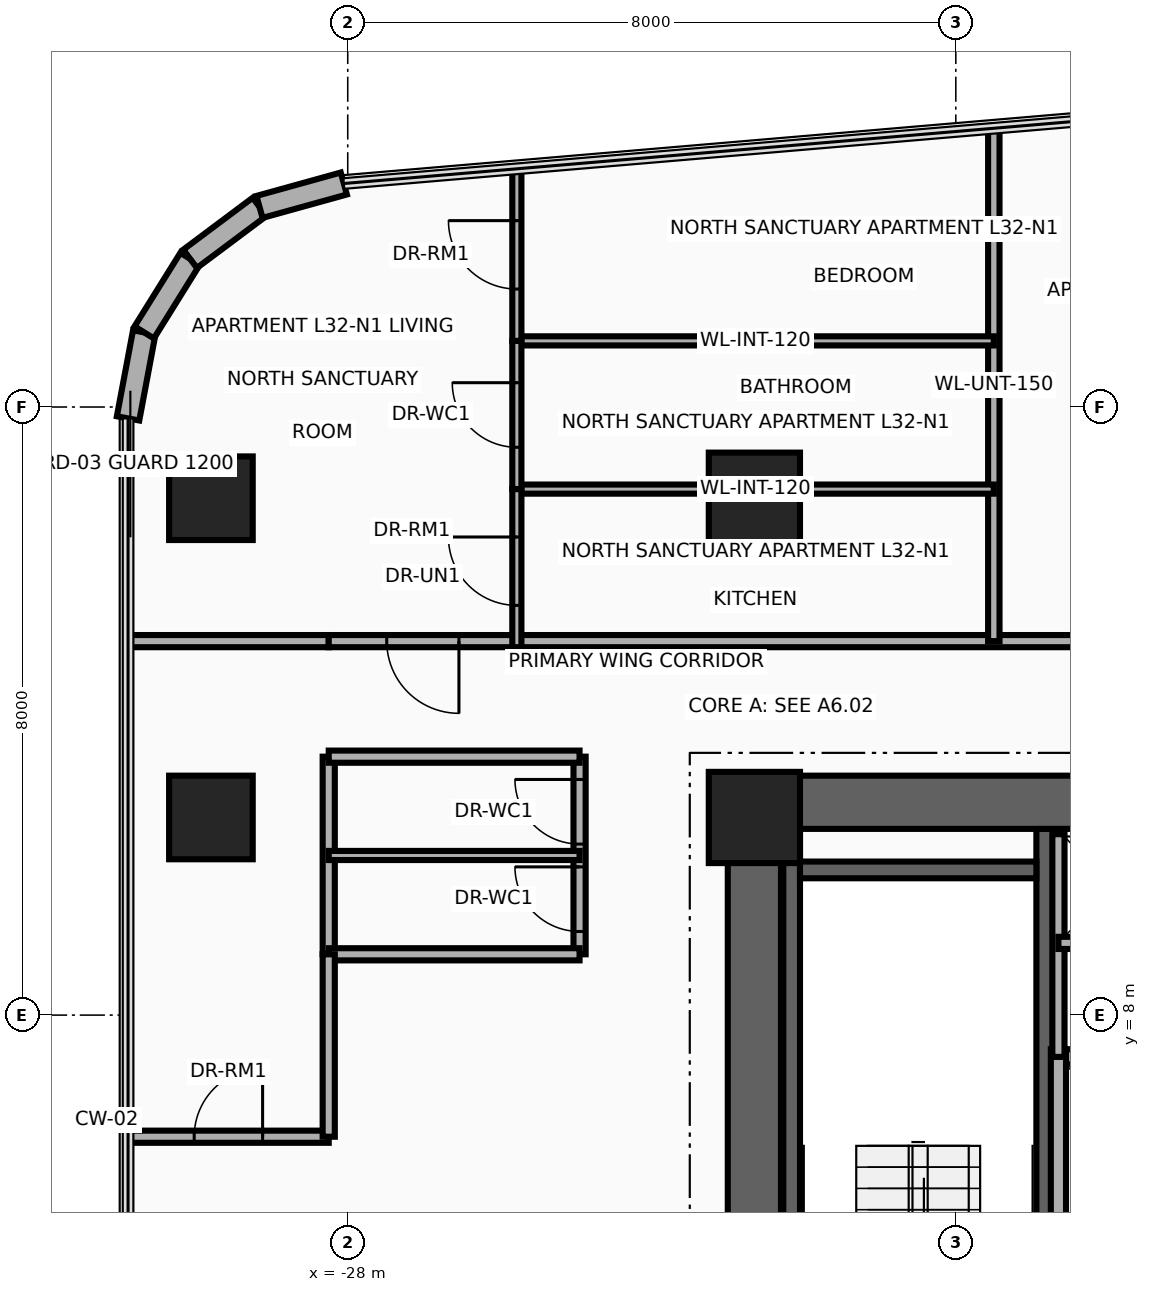
"""IFC4 building model, lengths in metres.
Left out: names, types, materials, properties, quantities, classifications, styles, units other than length and angle.
Written with IfcOpenShell. Run it as: python <this file> out.ifc"""

import sys

from ifc_helpers import new_model, si_unit, direction, frame, frame_2d, origin, origin_2d, place, context, subcontext, project, spatial, rectangle, circle, extrude, source, transform, mapped, element, fill, save


model = new_model("IFC4")
c1 = context("Model", 3, precision=1e-05, world=origin(), true_north=direction((0.0, 1.0)))
c2 = subcontext(c1, "Body", "Model", "MODEL_VIEW")
j1 = project(units=[si_unit("LENGTHUNIT", "METRE"), si_unit("PLANEANGLEUNIT", "RADIAN")], contexts=[c1])
p1 = place(None, origin())
s1 = spatial("IfcSite", under=j1, at=p1, CompositionType="ELEMENT")
p2 = place(p1, origin())
s2 = spatial("IfcBuilding", under=s1, at=p2, CompositionType="ELEMENT")
p3 = place(p2, frame((0.0, 0.0, 127.9)))
s3 = spatial("IfcBuildingStorey", under=s2, at=p3, CompositionType="ELEMENT", Elevation=127.9)
for number, where, z_axis, x_axis in (
    (1, (-22.16, 1.78, 0.0), (0.0, 0.0, 1.0), (0.0, 1.0, 0.0)),
    (2, (-18.83, 1.78, 0.0), (0.0, 0.0, 1.0), (0.0, 1.0, 0.0)),
):
    element("IfcWall", number, at=place(p3, frame(where, z_axis=z_axis, x_axis=x_axis)), inside=s3, PredefinedType="SHEAR", context=c2, shape_type="SweptSolid", body=[
        extrude(rectangle(XDim=8.67, YDim=0.22, at=frame_2d((4.335, 0.0))), origin(), (0.0, 0.0, 1.0), 3.46),
    ])
p4 = place(p3, frame((-22.05, 9.91, 0.0), z_axis=(0.0, 0.0, 1.0), x_axis=(1.0, 0.0, 0.0)))
e3 = element("IfcWall", 3, at=p4, inside=s3, PredefinedType="SHEAR", context=c2, shape_type="SweptSolid", body=[
    extrude(rectangle(XDim=3.11, YDim=0.22, at=frame_2d((1.555, 0.0))), origin(), (0.0, 0.0, 1.0), 3.46),
])
p5 = place(p3, frame((-22.65, -11.15, 0.0), z_axis=(0.0, 0.0, 1.0), x_axis=(0.0, 1.0, 0.0)))
e4 = element("IfcWall", 4, at=p5, inside=s3, PredefinedType="SHEAR", context=c2, shape_type="SweptSolid", body=[
    extrude(rectangle(XDim=22.3, YDim=0.7, at=frame_2d((11.15, 0.0))), origin(), (0.0, 0.0, 1.0), 3.46),
])
p6 = place(p3, frame((-22.65, 10.8, 0.0), z_axis=(0.0, 0.0, 1.0), x_axis=(1.0, 0.0, 0.0)))
e5 = element("IfcWall", 5, at=p6, inside=s3, PredefinedType="SHEAR", context=c2, shape_type="SweptSolid", body=[
    extrude(rectangle(XDim=10.25, YDim=0.7, at=frame_2d((5.125, 0.0))), origin(), (0.0, 0.0, 1.0), 3.46),
])
m1 = source(origin(), c2, "Body", "SweptSolid", [
    extrude(circle(Radius=0.55, at=origin_2d()), origin(), (0.0, 0.0, 1.0), 3.7),
])
p7 = place(p3, frame((-29.8, 10.6, 0.0), z_axis=(0.0, 0.0, 1.0), x_axis=(1.0, 0.0, 0.0)))
e6 = element("IfcColumn", 6, at=p7, inside=s3, PredefinedType="COLUMN", context=c2, shape_type="MappedRepresentation", body=[
    mapped(m1, transform((0.0, 0.0, 0.0), x_axis=(1.0, 0.0, 0.0), y_axis=(0.0, 1.0, 0.0), z_axis=(0.0, 0.0, 1.0), scale=1.0)),
])
m2 = source(origin(), c2, "Body", "SweptSolid", [
    extrude(rectangle(XDim=1.2, YDim=1.2, at=origin_2d()), origin(), (0.0, 0.0, 1.0), 3.7),
])
p8 = place(p3, frame((-22.65, 10.6, 0.0), z_axis=(0.0, 0.0, 1.0), x_axis=(1.0, 0.0, 0.0)))
e7 = element("IfcColumn", 7, at=p8, inside=s3, PredefinedType="COLUMN", context=c2, shape_type="MappedRepresentation", body=[
    mapped(m2, transform((0.0, 0.0, 0.0), x_axis=(1.0, 0.0, 0.0), y_axis=(0.0, 1.0, 0.0), z_axis=(0.0, 0.0, 1.0), scale=1.0)),
])
p9 = place(p3, frame((-29.8, 14.8, 0.0), z_axis=(0.0, 0.0, 1.0), x_axis=(1.0, 0.0, 0.0)))
e8 = element("IfcColumn", 8, at=p9, inside=s3, PredefinedType="COLUMN", context=c2, shape_type="MappedRepresentation", body=[
    mapped(m1, transform((0.0, 0.0, 0.0), x_axis=(1.0, 0.0, 0.0), y_axis=(0.0, 1.0, 0.0), z_axis=(0.0, 0.0, 1.0), scale=1.0)),
])
p10 = place(p3, frame((-22.65, 14.8, 0.0), z_axis=(0.0, 0.0, 1.0), x_axis=(1.0, 0.0, 0.0)))
e9 = element("IfcColumn", 9, at=p10, inside=s3, PredefinedType="COLUMN", context=c2, shape_type="MappedRepresentation", body=[
    mapped(m2, transform((0.0, 0.0, 0.0), x_axis=(1.0, 0.0, 0.0), y_axis=(0.0, 1.0, 0.0), z_axis=(0.0, 0.0, 1.0), scale=1.0)),
])
p11 = place(p3, frame((-30.89, 15.85, 0.0), z_axis=(0.0, 0.0, 1.0), x_axis=(0.184557499391, 0.982821718023, 0.0)))
e10 = element("IfcWall", 10, at=p11, inside=s3, PredefinedType="SOLIDWALL", context=c2, shape_type="SweptSolid", body=[
    extrude(rectangle(XDim=1.151, YDim=0.3, at=frame_2d((0.575, 0.0))), origin(), (0.0, 0.0, 1.0), 3.46),
])
p12 = place(p3, frame((-30.677, 16.981, 0.0), z_axis=(0.0, 0.0, 1.0), x_axis=(0.52880576008, 0.848742875143, 0.0)))
e11 = element("IfcWall", 11, at=p12, inside=s3, PredefinedType="SOLIDWALL", context=c2, shape_type="SweptSolid", body=[
    extrude(rectangle(XDim=1.141, YDim=0.3, at=frame_2d((0.57, 0.0))), origin(), (0.0, 0.0, 1.0), 3.46),
])
p13 = place(p3, frame((-30.074, 17.95, 0.0), z_axis=(0.0, 0.0, 1.0), x_axis=(0.800975009324, 0.598697782223, 0.0)))
e12 = element("IfcWall", 12, at=p13, inside=s3, PredefinedType="SOLIDWALL", context=c2, shape_type="SweptSolid", body=[
    extrude(rectangle(XDim=1.141, YDim=0.3, at=frame_2d((0.57, 0.0))), origin(), (0.0, 0.0, 1.0), 3.46),
])
p14 = place(p3, frame((-29.161, 18.633, 0.0), z_axis=(0.0, 0.0, 1.0), x_axis=(0.963624193367, 0.267260947313, 0.0)))
e13 = element("IfcWall", 13, at=p14, inside=s3, PredefinedType="SOLIDWALL", context=c2, shape_type="SweptSolid", body=[
    extrude(rectangle(XDim=1.151, YDim=0.3, at=frame_2d((0.575, 0.0))), origin(), (0.0, 0.0, 1.0), 3.46),
])
p15 = place(p3, frame((-18.65, 4.225, 0.0), z_axis=(0.0, 0.0, 1.0), x_axis=(0.0, 1.0, 0.0)))
e14 = element("IfcWall", 14, at=p15, inside=s3, PredefinedType="MOVABLE", context=c2, shape_type="SweptSolid", body=[
    extrude(rectangle(XDim=3.325, YDim=0.2, at=frame_2d((1.663, 0.0))), origin(), (0.0, 0.0, 1.0), 3.46),
])
p16 = place(p3, frame((-18.55, 7.45, 0.0), z_axis=(0.0, 0.0, 1.0), x_axis=(1.0, 0.0, 0.0)))
e15 = element("IfcWall", 15, at=p16, inside=s3, PredefinedType="MOVABLE", context=c2, shape_type="SweptSolid", body=[
    extrude(rectangle(XDim=2.6, YDim=0.2, at=frame_2d((1.3, 0.0))), origin(), (0.0, 0.0, 1.0), 3.46),
])
p17 = place(p16, frame((0.7, 0.0, 0.0)))
e16 = element("IfcOpeningElement", 16, at=p17, cuts=e15, PredefinedType="OPENING", context=c2, shape_type="SweptSolid", body=[
    extrude(rectangle(XDim=1.2, YDim=2.1, at=frame_2d((0.6, 1.05))), frame((0.0, 0.115, 0.0), z_axis=(0.0, -1.0, 0.0), x_axis=(1.0, 0.0, 0.0)), (0.0, 0.0, 1.0), 0.23),
])
p18 = place(p3, frame((-18.65, 7.45, 0.0), z_axis=(0.0, 0.0, 1.0), x_axis=(0.0, 1.0, 0.0)))
e17 = element("IfcWall", 17, at=p18, inside=s3, PredefinedType="PARTITIONING", context=c2, shape_type="SweptSolid", body=[
    extrude(rectangle(XDim=2.93, YDim=0.16, at=frame_2d((1.465, 0.0))), origin(), (0.0, 0.0, 1.0), 3.46),
])
p19 = place(p3, frame((-18.65, 8.95, 0.0), z_axis=(0.0, 0.0, 1.0), x_axis=(1.0, 0.0, 0.0)))
e18 = element("IfcWall", 18, at=p19, inside=s3, PredefinedType="PARTITIONING", context=c2, shape_type="SweptSolid", body=[
    extrude(rectangle(XDim=5.5, YDim=0.16, at=frame_2d((2.75, 0.0))), origin(), (0.0, 0.0, 1.0), 3.46),
])
p20 = place(p19, frame((0.3, 0.0, 0.0)))
e19 = element("IfcOpeningElement", 19, at=p20, cuts=e18, PredefinedType="OPENING", context=c2, shape_type="SweptSolid", body=[
    extrude(rectangle(XDim=0.85, YDim=2.05, at=frame_2d((0.425, 1.025))), frame((0.0, 0.095, 0.0), z_axis=(0.0, -1.0, 0.0), x_axis=(1.0, 0.0, 0.0)), (0.0, 0.0, 1.0), 0.19),
])
p21 = place(p19, frame((2.5, 0.0, 0.0)))
e20 = element("IfcOpeningElement", 20, at=p21, cuts=e18, PredefinedType="OPENING", context=c2, shape_type="SweptSolid", body=[
    extrude(rectangle(XDim=0.95, YDim=2.15, at=frame_2d((0.475, 1.075))), frame((0.0, 0.095, 0.0), z_axis=(0.0, -1.0, 0.0), x_axis=(1.0, 0.0, 0.0)), (0.0, 0.0, 1.0), 0.19),
])
p22 = place(p3, frame((-28.25, 8.8, 0.0), z_axis=(0.0, 0.0, 1.0), x_axis=(0.0, 1.0, 0.0)))
e21 = element("IfcWall", 21, at=p22, inside=s3, PredefinedType="PARTITIONING", context=c2, shape_type="SweptSolid", body=[
    extrude(rectangle(XDim=2.6, YDim=0.16, at=frame_2d((1.3, 0.0))), origin(), (0.0, 0.0, 1.0), 2.666),
])
p23 = place(p3, frame((-24.95, 8.8, 0.0), z_axis=(0.0, 0.0, 1.0), x_axis=(0.0, 1.0, 0.0)))
e22 = element("IfcWall", 22, at=p23, inside=s3, PredefinedType="PARTITIONING", context=c2, shape_type="SweptSolid", body=[
    extrude(rectangle(XDim=2.6, YDim=0.16, at=frame_2d((1.3, 0.0))), origin(), (0.0, 0.0, 1.0), 2.666),
])
p24 = place(p23, frame((0.3, 0.0, 0.0)))
e23 = element("IfcOpeningElement", 23, at=p24, cuts=e22, PredefinedType="OPENING", context=c2, shape_type="SweptSolid", body=[
    extrude(rectangle(XDim=0.85, YDim=2.1, at=frame_2d((0.425, 1.05))), frame((0.0, 0.095, 0.0), z_axis=(0.0, -1.0, 0.0), x_axis=(1.0, 0.0, 0.0)), (0.0, 0.0, 1.0), 0.19),
])
p25 = place(p23, frame((1.45, 0.0, 0.0)))
e24 = element("IfcOpeningElement", 24, at=p25, cuts=e22, PredefinedType="OPENING", context=c2, shape_type="SweptSolid", body=[
    extrude(rectangle(XDim=0.85, YDim=2.1, at=frame_2d((0.425, 1.05))), frame((0.0, 0.095, 0.0), z_axis=(0.0, -1.0, 0.0), x_axis=(1.0, 0.0, 0.0)), (0.0, 0.0, 1.0), 0.19),
])
for number, where, z_axis, x_axis in (
    (25, (-28.25, 8.8, 0.0), (0.0, 0.0, 1.0), (1.0, 0.0, 0.0)),
    (26, (-28.25, 11.4, 0.0), (0.0, 0.0, 1.0), (1.0, 0.0, 0.0)),
):
    element("IfcWall", number, at=place(p3, frame(where, z_axis=z_axis, x_axis=x_axis)), inside=s3, PredefinedType="PARTITIONING", context=c2, shape_type="SweptSolid", body=[
        extrude(rectangle(XDim=3.3, YDim=0.16, at=frame_2d((1.65, 0.0))), origin(), (0.0, 0.0, 1.0), 3.46),
    ])
p26 = place(p3, frame((-28.25, 10.1, 0.0), z_axis=(0.0, 0.0, 1.0), x_axis=(1.0, 0.0, 0.0)))
e27 = element("IfcWall", 27, at=p26, inside=s3, PredefinedType="PARTITIONING", context=c2, shape_type="SweptSolid", body=[
    extrude(rectangle(XDim=3.3, YDim=0.12, at=frame_2d((1.65, 0.0))), origin(), (0.0, 0.0, 1.0), 3.46),
])
p27 = place(p3, frame((-30.89, 6.4, 0.0), z_axis=(0.0, 0.0, 1.0), x_axis=(1.0, 0.0, 0.0)))
e28 = element("IfcWall", 28, at=p27, inside=s3, PredefinedType="PARTITIONING", context=c2, shape_type="SweptSolid", body=[
    extrude(rectangle(XDim=2.64, YDim=0.16, at=frame_2d((1.32, 0.0))), origin(), (0.0, 0.0, 1.0), 2.896),
])
p28 = place(p27, frame((0.87, 0.0, 0.0)))
e29 = element("IfcOpeningElement", 29, at=p28, cuts=e28, PredefinedType="OPENING", context=c2, shape_type="SweptSolid", body=[
    extrude(rectangle(XDim=0.9, YDim=2.1, at=frame_2d((0.45, 1.05))), frame((0.0, 0.095, 0.0), z_axis=(0.0, -1.0, 0.0), x_axis=(1.0, 0.0, 0.0)), (0.0, 0.0, 1.0), 0.19),
])
p29 = place(p3, frame((-28.25, 6.4, 0.0), z_axis=(0.0, 0.0, 1.0), x_axis=(0.0, 1.0, 0.0)))
e30 = element("IfcWall", 30, at=p29, inside=s3, PredefinedType="PARTITIONING", context=c2, shape_type="SweptSolid", body=[
    extrude(rectangle(XDim=2.4, YDim=0.16, at=frame_2d((1.2, 0.0))), origin(), (0.0, 0.0, 1.0), 2.988),
])
p30 = place(p3, frame((-30.89, 12.92, 0.0), z_axis=(0.0, 0.0, 1.0), x_axis=(1.0, 0.0, 0.0)))
e31 = element("IfcWall", 31, at=p30, inside=s3, PredefinedType="PARTITIONING", context=c2, shape_type="SweptSolid", body=[
    extrude(rectangle(XDim=2.64, YDim=0.16, at=frame_2d((1.32, 0.0))), origin(), (0.0, 0.0, 1.0), 2.896),
])
p31 = place(p3, frame((-28.25, 12.92, 0.0), z_axis=(0.0, 0.0, 1.0), x_axis=(1.0, 0.0, 0.0)))
e32 = element("IfcWall", 32, at=p31, inside=s3, PredefinedType="PARTITIONING", context=c2, shape_type="SweptSolid", body=[
    extrude(rectangle(XDim=41.8, YDim=0.16, at=frame_2d((20.9, 0.0))), origin(), (0.0, 0.0, 1.0), 2.666),
])
p32 = place(p31, frame((0.763, 0.0, 0.0)))
e33 = element("IfcOpeningElement", 33, at=p32, cuts=e32, PredefinedType="OPENING", context=c2, shape_type="SweptSolid", body=[
    extrude(rectangle(XDim=0.95, YDim=2.15, at=frame_2d((0.475, 1.075))), frame((0.0, 0.095, 0.0), z_axis=(0.0, -1.0, 0.0), x_axis=(1.0, 0.0, 0.0)), (0.0, 0.0, 1.0), 0.19),
])
p33 = place(p31, frame((10.696, 0.0, 0.0)))
e34 = element("IfcOpeningElement", 34, at=p33, cuts=e32, PredefinedType="OPENING", context=c2, shape_type="SweptSolid", body=[
    extrude(rectangle(XDim=0.95, YDim=2.15, at=frame_2d((0.475, 1.075))), frame((0.0, 0.095, 0.0), z_axis=(0.0, -1.0, 0.0), x_axis=(1.0, 0.0, 0.0)), (0.0, 0.0, 1.0), 0.19),
])
p34 = place(p31, frame((22.215, 0.0, 0.0)))
e35 = element("IfcOpeningElement", 35, at=p34, cuts=e32, PredefinedType="OPENING", context=c2, shape_type="SweptSolid", body=[
    extrude(rectangle(XDim=0.95, YDim=2.15, at=frame_2d((0.475, 1.075))), frame((0.0, 0.095, 0.0), z_axis=(0.0, -1.0, 0.0), x_axis=(1.0, 0.0, 0.0)), (0.0, 0.0, 1.0), 0.19),
])
p35 = place(p31, frame((32.652, 0.0, 0.0)))
e36 = element("IfcOpeningElement", 36, at=p35, cuts=e32, PredefinedType="OPENING", context=c2, shape_type="SweptSolid", body=[
    extrude(rectangle(XDim=0.95, YDim=2.15, at=frame_2d((0.475, 1.075))), frame((0.0, 0.095, 0.0), z_axis=(0.0, -1.0, 0.0), x_axis=(1.0, 0.0, 0.0)), (0.0, 0.0, 1.0), 0.19),
])
p36 = place(p3, frame((-19.5, 12.92, 0.0), z_axis=(0.0, 0.0, 1.0), x_axis=(0.0, 1.0, 0.0)))
e37 = element("IfcWall", 37, at=p36, inside=s3, PredefinedType="PARTITIONING", context=c2, shape_type="SweptSolid", body=[
    extrude(rectangle(XDim=6.747, YDim=0.15, at=frame_2d((3.374, 0.0))), origin(), (0.0, 0.0, 1.0), 2.666),
])
p37 = place(p3, frame((-25.775, 14.92, 0.0), z_axis=(0.0, 0.0, 1.0), x_axis=(1.0, 0.0, 0.0)))
e38 = element("IfcWall", 38, at=p37, inside=s3, PredefinedType="PARTITIONING", context=c2, shape_type="SweptSolid", body=[
    extrude(rectangle(XDim=6.275, YDim=0.12, at=frame_2d((3.137, 0.0))), origin(), (0.0, 0.0, 1.0), 2.666),
])
p38 = place(p3, frame((-25.775, 16.87, 0.0), z_axis=(0.0, 0.0, 1.0), x_axis=(1.0, 0.0, 0.0)))
e39 = element("IfcWall", 39, at=p38, inside=s3, PredefinedType="PARTITIONING", context=c2, shape_type="SweptSolid", body=[
    extrude(rectangle(XDim=6.275, YDim=0.12, at=frame_2d((3.137, 0.0))), origin(), (0.0, 0.0, 1.0), 3.46),
])
p39 = place(p3, frame((-25.775, 14.92, 0.0), z_axis=(0.0, 0.0, 1.0), x_axis=(0.0, 1.0, 0.0)))
e40 = element("IfcWall", 40, at=p39, inside=s3, PredefinedType="PARTITIONING", context=c2, shape_type="SweptSolid", body=[
    extrude(rectangle(XDim=1.95, YDim=0.12, at=frame_2d((0.975, 0.0))), origin(), (0.0, 0.0, 1.0), 2.666),
])
p40 = place(p39, frame((0.55, 0.0, 0.0)))
e41 = element("IfcOpeningElement", 41, at=p40, cuts=e40, PredefinedType="OPENING", context=c2, shape_type="SweptSolid", body=[
    extrude(rectangle(XDim=0.85, YDim=2.1, at=frame_2d((0.425, 1.05))), frame((0.0, 0.075, 0.0), z_axis=(0.0, -1.0, 0.0), x_axis=(1.0, 0.0, 0.0)), (0.0, 0.0, 1.0), 0.15),
])
p41 = place(p3, frame((-25.775, 12.84, 0.0), z_axis=(0.0, 0.0, 1.0), x_axis=(0.0, 1.0, 0.0)))
e42 = element("IfcWall", 42, at=p41, inside=s3, PredefinedType="PARTITIONING", context=c2, shape_type="SweptSolid", body=[
    extrude(rectangle(XDim=2.08, YDim=0.12, at=frame_2d((1.04, 0.0))), origin(), (0.0, 0.0, 1.0), 2.666),
])
p42 = place(p41, frame((0.55, 0.0, 0.0)))
e43 = element("IfcOpeningElement", 43, at=p42, cuts=e42, PredefinedType="OPENING", context=c2, shape_type="SweptSolid", body=[
    extrude(rectangle(XDim=0.9, YDim=2.1, at=frame_2d((0.45, 1.05))), frame((0.0, 0.075, 0.0), z_axis=(0.0, -1.0, 0.0), x_axis=(1.0, 0.0, 0.0)), (0.0, 0.0, 1.0), 0.15),
])
p43 = place(p3, frame((-25.775, 16.87, 0.0), z_axis=(0.0, 0.0, 1.0), x_axis=(0.0, 1.0, 0.0)))
e44 = element("IfcWall", 44, at=p43, inside=s3, PredefinedType="PARTITIONING", context=c2, shape_type="SweptSolid", body=[
    extrude(rectangle(XDim=2.264, YDim=0.12, at=frame_2d((1.132, 0.0))), origin(), (0.0, 0.0, 1.0), 3.46),
])
p44 = place(p43, frame((0.682, 0.0, 0.0)))
e45 = element("IfcOpeningElement", 45, at=p44, cuts=e44, PredefinedType="OPENING", context=c2, shape_type="SweptSolid", body=[
    extrude(rectangle(XDim=0.9, YDim=2.1, at=frame_2d((0.45, 1.05))), frame((0.0, 0.075, 0.0), z_axis=(0.0, -1.0, 0.0), x_axis=(1.0, 0.0, 0.0)), (0.0, 0.0, 1.0), 0.15),
])
p45 = place(p24, origin())
e46 = element("IfcDoor", 46, at=p45, inside=s3, OperationType="SINGLE_SWING_RIGHT", PredefinedType="DOOR", context=c2, shape_type="SweptSolid", body=[
    extrude(rectangle(XDim=0.85, YDim=2.1, at=frame_2d((0.425, 1.05))), frame((0.0, 0.025, 0.0), z_axis=(0.0, -1.0, 0.0), x_axis=(1.0, 0.0, 0.0)), (0.0, 0.0, 1.0), 0.05),
])
fill(e23, e46)
p46 = place(p25, origin())
e47 = element("IfcDoor", 47, at=p46, inside=s3, OperationType="SINGLE_SWING_LEFT", PredefinedType="DOOR", context=c2, shape_type="SweptSolid", body=[
    extrude(rectangle(XDim=0.85, YDim=2.1, at=frame_2d((0.425, 1.05))), frame((0.0, 0.025, 0.0), z_axis=(0.0, -1.0, 0.0), x_axis=(1.0, 0.0, 0.0)), (0.0, 0.0, 1.0), 0.05),
])
fill(e24, e47)
p47 = place(p28, origin())
e48 = element("IfcDoor", 48, at=p47, inside=s3, OperationType="SINGLE_SWING_RIGHT", PredefinedType="DOOR", context=c2, shape_type="SweptSolid", body=[
    extrude(rectangle(XDim=0.9, YDim=2.1, at=frame_2d((0.45, 1.05))), frame((0.0, 0.025, 0.0), z_axis=(0.0, -1.0, 0.0), x_axis=(1.0, 0.0, 0.0)), (0.0, 0.0, 1.0), 0.05),
])
fill(e29, e48)
p48 = place(p32, frame((0.95, 0.0, 0.0), z_axis=(0.0, 0.0, 1.0), x_axis=(-1.0, 0.0, 0.0)))
e49 = element("IfcDoor", 49, at=p48, inside=s3, OperationType="SINGLE_SWING_LEFT", PredefinedType="DOOR", context=c2, shape_type="SweptSolid", body=[
    extrude(rectangle(XDim=0.95, YDim=2.15, at=frame_2d((0.475, 1.075))), frame((0.0, 0.025, 0.0), z_axis=(0.0, -1.0, 0.0), x_axis=(1.0, 0.0, 0.0)), (0.0, 0.0, 1.0), 0.05),
])
fill(e33, e49)
p49 = place(p40, origin())
e50 = element("IfcDoor", 50, at=p49, inside=s3, OperationType="SINGLE_SWING_RIGHT", PredefinedType="DOOR", context=c2, shape_type="SweptSolid", body=[
    extrude(rectangle(XDim=0.85, YDim=2.1, at=frame_2d((0.425, 1.05))), frame((0.0, 0.025, 0.0), z_axis=(0.0, -1.0, 0.0), x_axis=(1.0, 0.0, 0.0)), (0.0, 0.0, 1.0), 0.05),
])
fill(e41, e50)
p50 = place(p42, origin())
e51 = element("IfcDoor", 51, at=p50, inside=s3, OperationType="SINGLE_SWING_LEFT", PredefinedType="DOOR", context=c2, shape_type="SweptSolid", body=[
    extrude(rectangle(XDim=0.9, YDim=2.1, at=frame_2d((0.45, 1.05))), frame((0.0, 0.025, 0.0), z_axis=(0.0, -1.0, 0.0), x_axis=(1.0, 0.0, 0.0)), (0.0, 0.0, 1.0), 0.05),
])
fill(e43, e51)
p51 = place(p44, origin())
e52 = element("IfcDoor", 52, at=p51, inside=s3, OperationType="SINGLE_SWING_RIGHT", PredefinedType="DOOR", context=c2, shape_type="SweptSolid", body=[
    extrude(rectangle(XDim=0.9, YDim=2.1, at=frame_2d((0.45, 1.05))), frame((0.0, 0.025, 0.0), z_axis=(0.0, -1.0, 0.0), x_axis=(1.0, 0.0, 0.0)), (0.0, 0.0, 1.0), 0.05),
])
fill(e45, e52)
save(model, sys.argv[1])
